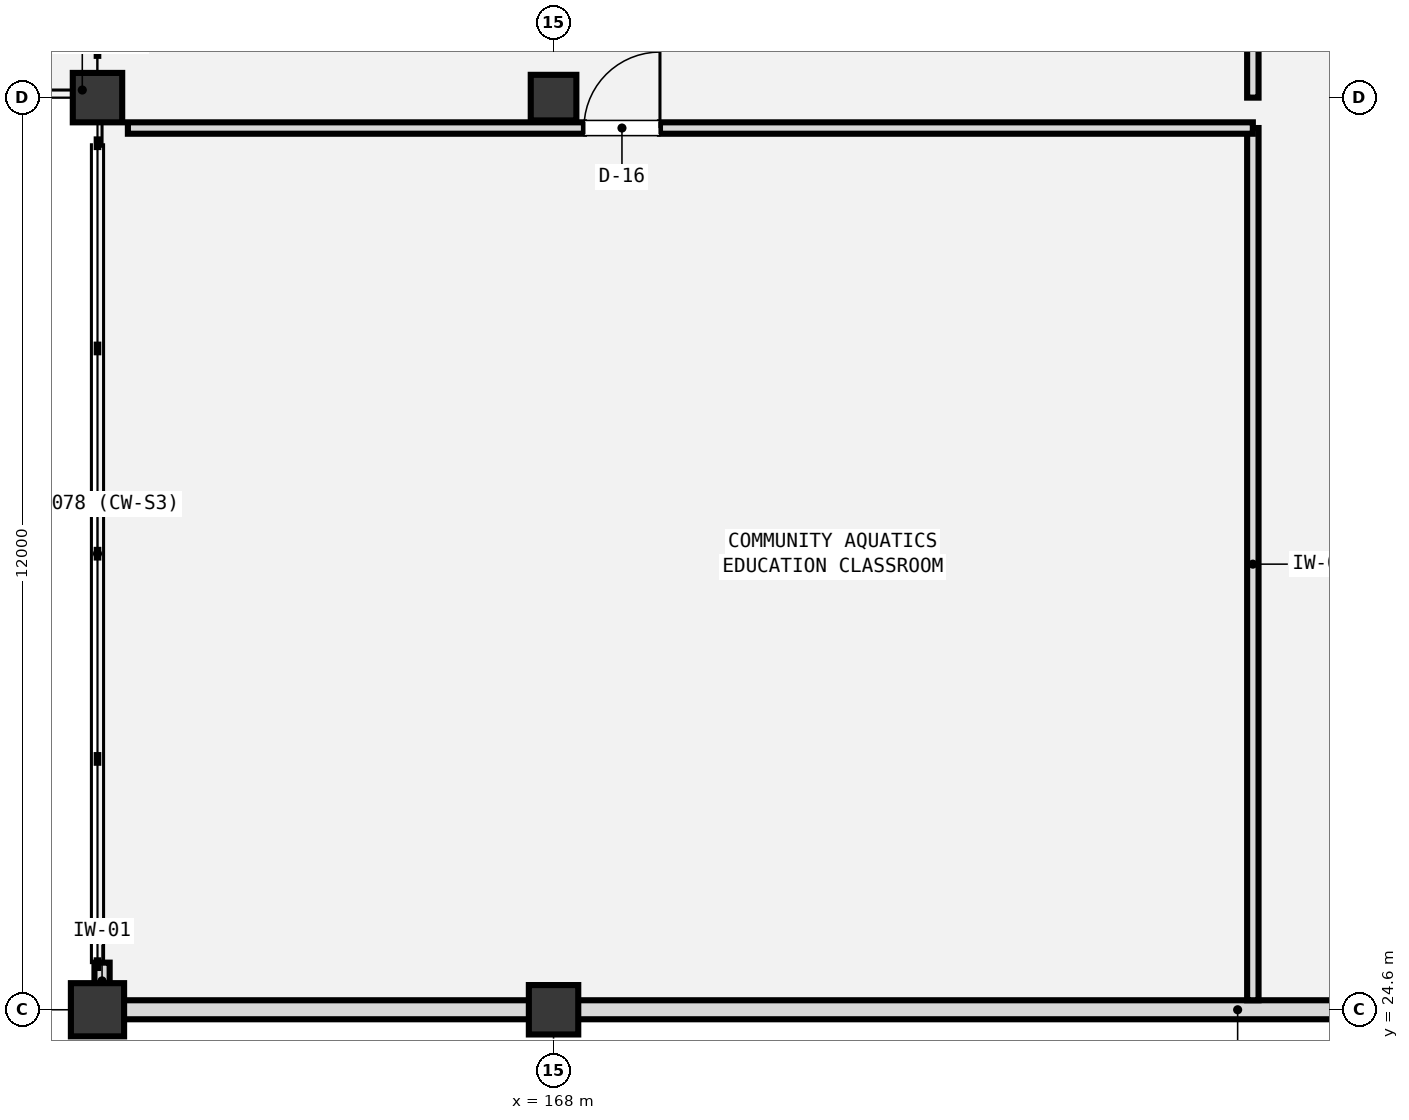
"""IFC4 building model, lengths in metres.
Left out: names, types, materials, properties, quantities, classifications, styles, units other than length and angle.
Written with IfcOpenShell. Run it as: python <this file> out.ifc"""

import sys

from ifc_helpers import new_model, si_unit, direction, frame, frame_2d, origin, origin_2d, place, context, subcontext, project, spatial, rectangle, extrude, element, fill, save


model = new_model("IFC4")
c1 = context("Model", 3, precision=1e-05, world=origin(), true_north=direction((0.0, 1.0)))
c2 = subcontext(c1, "Body", "Model", "MODEL_VIEW")
j1 = project(units=[si_unit("LENGTHUNIT", "METRE"), si_unit("PLANEANGLEUNIT", "RADIAN")], contexts=[c1])
p1 = place(None, origin())
s1 = spatial("IfcSite", under=j1, at=p1, CompositionType="ELEMENT")
p2 = place(p1, origin())
s2 = spatial("IfcBuilding", under=s1, at=p2, CompositionType="ELEMENT")
p3 = place(p2, frame((0.0, 0.0, 5.4)))
s3 = spatial("IfcBuildingStorey", under=s2, at=p3, CompositionType="ELEMENT", Elevation=5.4)
p4 = place(p3, frame((162.0, 24.6, 0.0), z_axis=(0.0, 0.0, 1.0), x_axis=(1.0, 0.0, 0.0)))
e1 = element("IfcColumn", 1, at=p4, inside=s3, PredefinedType="COLUMN", context=c2, shape_type="SweptSolid", body=[
    extrude(rectangle(XDim=0.7, YDim=0.7, at=origin_2d()), origin(), (0.0, 0.0, 1.0), 4.2),
])
p5 = place(p3, frame((162.0, 36.6, 0.0), z_axis=(0.0, 0.0, 1.0), x_axis=(1.0, 0.0, 0.0)))
e2 = element("IfcColumn", 2, at=p5, inside=s3, PredefinedType="COLUMN", context=c2, shape_type="SweptSolid", body=[
    extrude(rectangle(XDim=0.65, YDim=0.65, at=origin_2d()), origin(), (0.0, 0.0, 1.0), 4.2),
])
p6 = place(p3, frame((168.0, 24.6, 0.0), z_axis=(0.0, 0.0, 1.0), x_axis=(1.0, 0.0, 0.0)))
e3 = element("IfcColumn", 3, at=p6, inside=s3, PredefinedType="COLUMN", context=c2, shape_type="SweptSolid", body=[
    extrude(rectangle(XDim=0.65, YDim=0.65, at=origin_2d()), origin(), (0.0, 0.0, 1.0), 2.76),
])
p7 = place(p3, frame((168.0, 36.6, 0.0), z_axis=(0.0, 0.0, 1.0), x_axis=(1.0, 0.0, 0.0)))
e4 = element("IfcColumn", 4, at=p7, inside=s3, PredefinedType="COLUMN", context=c2, shape_type="SweptSolid", body=[
    extrude(rectangle(XDim=0.6, YDim=0.6, at=origin_2d()), origin(), (0.0, 0.0, 1.0), 2.76),
])
p8 = place(p3, frame((162.0, 24.6, 3.08), z_axis=(0.0, 0.0, 1.0), x_axis=(1.0, 0.0, 0.0)))
e5 = element("IfcWall", 5, at=p8, inside=s3, PredefinedType="PARAPET", context=c2, shape_type="SweptSolid", body=[
    extrude(rectangle(XDim=30.0, YDim=0.25, at=frame_2d((15.0, 0.0))), origin(), (0.0, 0.0, 1.0), 1.15),
])
p9 = place(p3, frame((177.2, 24.725, 0.0), z_axis=(0.0, 0.0, 1.0), x_axis=(0.0, 1.0, 0.0)))
e6 = element("IfcWall", 6, at=p9, inside=s3, PredefinedType="PARTITIONING", context=c2, shape_type="SweptSolid", body=[
    extrude(rectangle(XDim=11.475, YDim=0.15, at=frame_2d((5.737, 0.0))), origin(), (0.0, 0.0, 1.0), 2.6),
])
p10 = place(p3, frame((162.4, 36.2, 0.0), z_axis=(0.0, 0.0, 1.0), x_axis=(1.0, 0.0, 0.0)))
e7 = element("IfcWall", 7, at=p10, inside=s3, PredefinedType="PARTITIONING", context=c2, shape_type="SweptSolid", body=[
    extrude(rectangle(XDim=14.8, YDim=0.15, at=frame_2d((7.4, 0.0))), origin(), (0.0, 0.0, 1.0), 2.6),
])
p11 = place(p10, frame((6.0, 0.0, 0.0)))
e8 = element("IfcOpeningElement", 8, at=p11, cuts=e7, PredefinedType="OPENING", context=c2, shape_type="SweptSolid", body=[
    extrude(rectangle(XDim=1.0, YDim=2.2, at=frame_2d((0.5, 1.1))), frame((0.0, 0.085, 0.0), z_axis=(0.0, -1.0, 0.0), x_axis=(1.0, 0.0, 0.0)), (0.0, 0.0, 1.0), 0.17),
])
p12 = place(p3, frame((177.2, 36.6, 0.0), z_axis=(0.0, 0.0, 1.0), x_axis=(0.0, 1.0, 0.0)))
e9 = element("IfcWall", 9, at=p12, inside=s3, PredefinedType="PARTITIONING", context=c2, shape_type="SweptSolid", body=[
    extrude(rectangle(XDim=13.6, YDim=0.15, at=frame_2d((6.8, 0.0))), origin(), (0.0, 0.0, 1.0), 2.6),
])
p13 = place(p12, frame((6.0, 0.0, 0.0)))
e10 = element("IfcOpeningElement", 10, at=p13, cuts=e9, PredefinedType="OPENING", context=c2, shape_type="SweptSolid", body=[
    extrude(rectangle(XDim=1.6, YDim=2.2, at=frame_2d((0.8, 1.1))), frame((0.0, 0.085, 0.0), z_axis=(0.0, -1.0, 0.0), x_axis=(1.0, 0.0, 0.0)), (0.0, 0.0, 1.0), 0.17),
])
p14 = place(p3, frame((162.06, 24.74, 0.0), z_axis=(0.0, 0.0, 1.0), x_axis=(0.0, 1.0, 0.0)))
e11 = element("IfcWall", 11, at=p14, inside=s3, PredefinedType="SOLIDWALL", context=c2, shape_type="SweptSolid", body=[
    extrude(rectangle(XDim=0.48, YDim=0.2, at=frame_2d((0.24, 0.0))), origin(), (0.0, 0.0, 1.0), 2.31),
])
p15 = place(p11, origin())
e12 = element("IfcDoor", 12, at=p15, inside=s3, OperationType="SINGLE_SWING_RIGHT", PredefinedType="DOOR", context=c2, shape_type="SweptSolid", body=[
    extrude(rectangle(XDim=1.0, YDim=2.2, at=frame_2d((0.5, 1.1))), frame((0.0, 0.025, 0.0), z_axis=(0.0, -1.0, 0.0), x_axis=(1.0, 0.0, 0.0)), (0.0, 0.0, 1.0), 0.05),
])
fill(e8, e12)
save(model, sys.argv[1])
